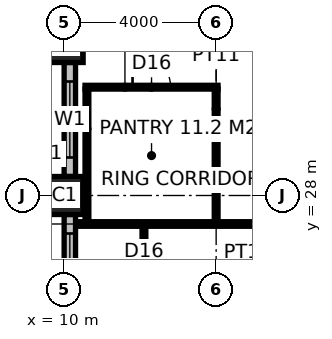
"""IFC4 building model, lengths in metres.
Left out: names, types, materials, properties, quantities, classifications, styles, units other than length and angle.
Written with IfcOpenShell. Run it as: python <this file> out.ifc"""

import sys

from ifc_helpers import new_model, si_unit, direction, frame, frame_2d, origin, origin_2d, place, context, subcontext, project, spatial, rectangle, hollow_rectangle, extrude, element, fill, save


model = new_model("IFC4")
c1 = context("Model", 3, precision=1e-05, world=origin(), true_north=direction((0.0, 1.0)))
c2 = subcontext(c1, "Body", "Model", "MODEL_VIEW")
j1 = project(units=[si_unit("LENGTHUNIT", "METRE"), si_unit("PLANEANGLEUNIT", "RADIAN")], contexts=[c1])
p1 = place(None, origin())
s1 = spatial("IfcSite", under=j1, at=p1, CompositionType="ELEMENT")
p2 = place(p1, origin())
s2 = spatial("IfcBuilding", under=s1, at=p2, CompositionType="ELEMENT")
p3 = place(p2, frame((0.0, 0.0, 121.4)))
s3 = spatial("IfcBuildingStorey", under=s2, at=p3, CompositionType="ELEMENT", Elevation=121.4)
for number, where, z_axis, x_axis in (
    (1, (10.0, 28.0, 0.0), (0.0, 0.0, 1.0), (1.0, 0.0, 0.0)),
    (2, (10.0, 32.0, 0.0), (0.0, 0.0, 1.0), (1.0, 0.0, 0.0)),
):
    element("IfcColumn", number, at=place(p3, frame(where, z_axis=z_axis, x_axis=x_axis)), inside=s3, PredefinedType="COLUMN", context=c2, shape_type="SweptSolid", body=[
        extrude(hollow_rectangle(XDim=1.0, YDim=1.0, WallThickness=0.1, at=origin_2d()), origin(), (0.0, 0.0, 1.0), 4.0),
    ])
p4 = place(p3, frame((10.3, 27.25, 0.0), z_axis=(0.0, 0.0, 1.0), x_axis=(1.0, 0.0, 0.0)))
e3 = element("IfcWall", 3, at=p4, inside=s3, PredefinedType="PARTITIONING", context=c2, shape_type="SweptSolid", body=[
    extrude(rectangle(XDim=5.325, YDim=0.12, at=frame_2d((2.663, 0.0))), origin(), (0.0, 0.0, 1.0), 3.85),
])
p5 = place(p3, frame((10.55, 30.85, 0.0), z_axis=(0.0, 0.0, 1.0), x_axis=(1.0, 0.0, 0.0)))
e4 = element("IfcWall", 4, at=p5, inside=s3, PredefinedType="PARTITIONING", context=c2, shape_type="SweptSolid", body=[
    extrude(rectangle(XDim=3.5, YDim=0.1, at=frame_2d((1.75, 0.0))), origin(), (0.0, 0.0, 1.0), 3.85),
])
p6 = place(p5, frame((1.25, 0.0, 0.0)))
e5 = element("IfcOpeningElement", 5, at=p6, cuts=e4, PredefinedType="OPENING", context=c2, shape_type="SweptSolid", body=[
    extrude(rectangle(XDim=1.0, YDim=2.2, at=frame_2d((0.5, 1.1))), frame((0.0, 0.06, 0.0), z_axis=(0.0, -1.0, 0.0), x_axis=(1.0, 0.0, 0.0)), (0.0, 0.0, 1.0), 0.12),
])
p7 = place(p3, frame((10.6, 27.31, 0.0), z_axis=(0.0, 0.0, 1.0), x_axis=(0.0, 1.0, 0.0)))
e6 = element("IfcWall", 6, at=p7, inside=s3, PredefinedType="PARTITIONING", context=c2, shape_type="SweptSolid", body=[
    extrude(rectangle(XDim=3.49, YDim=0.1, at=frame_2d((1.745, 0.0))), origin(), (0.0, 0.0, 1.0), 3.85),
])
p8 = place(p3, frame((12.1, 23.649, 0.0), z_axis=(0.0, 0.0, 1.0), x_axis=(0.0, 1.0, 0.0)))
e7 = element("IfcWall", 7, at=p8, inside=s3, PredefinedType="PARTITIONING", context=c2, shape_type="SweptSolid", body=[
    extrude(rectangle(XDim=3.54, YDim=0.1, at=frame_2d((1.77, 0.0))), origin(), (0.0, 0.0, 1.0), 3.85),
])
p9 = place(p8, frame((1.275, 0.0, 0.0)))
e8 = element("IfcOpeningElement", 8, at=p9, cuts=e7, PredefinedType="OPENING", context=c2, shape_type="SweptSolid", body=[
    extrude(rectangle(XDim=1.0, YDim=2.2, at=frame_2d((0.5, 1.1))), frame((0.0, 0.06, 0.0), z_axis=(0.0, -1.0, 0.0), x_axis=(1.0, 0.0, 0.0)), (0.0, 0.0, 1.0), 0.12),
])
p10 = place(p3, frame((14.0, 27.31, 0.0), z_axis=(0.0, 0.0, 1.0), x_axis=(0.0, 1.0, 0.0)))
e9 = element("IfcWall", 9, at=p10, inside=s3, PredefinedType="PARTITIONING", context=c2, shape_type="SweptSolid", body=[
    extrude(rectangle(XDim=3.49, YDim=0.1, at=frame_2d((1.745, 0.0))), origin(), (0.0, 0.0, 1.0), 3.85),
])
p11 = place(p3, frame((10.15, 27.5, 0.0), z_axis=(0.0, 0.0, 1.0), x_axis=(0.0, -1.0, 0.0)))
e10 = element("IfcWall", 10, at=p11, inside=s3, PredefinedType="ELEMENTEDWALL", context=c2, shape_type="SweptSolid", body=[
    extrude(rectangle(XDim=3.0, YDim=0.3, at=frame_2d((1.5, 0.0))), origin(), (0.0, 0.0, 1.0), 2.85),
])
p12 = place(p11, frame((0.5, 0.0, 0.8)))
e11 = element("IfcOpeningElement", 11, at=p12, cuts=e10, PredefinedType="OPENING", context=c2, shape_type="SweptSolid", body=[
    extrude(rectangle(XDim=2.0, YDim=2.0, at=frame_2d((1.0, 1.0))), frame((0.0, 0.16, 0.0), z_axis=(0.0, -1.0, 0.0), x_axis=(1.0, 0.0, 0.0)), (0.0, 0.0, 1.0), 0.32),
])
p13 = place(p3, frame((10.15, 31.5, 0.0), z_axis=(0.0, 0.0, 1.0), x_axis=(0.0, -1.0, 0.0)))
e12 = element("IfcWall", 12, at=p13, inside=s3, PredefinedType="ELEMENTEDWALL", context=c2, shape_type="SweptSolid", body=[
    extrude(rectangle(XDim=3.0, YDim=0.3, at=frame_2d((1.5, 0.0))), origin(), (0.0, 0.0, 1.0), 2.85),
])
p14 = place(p13, frame((0.5, 0.0, 0.8)))
e13 = element("IfcOpeningElement", 13, at=p14, cuts=e12, PredefinedType="OPENING", context=c2, shape_type="SweptSolid", body=[
    extrude(rectangle(XDim=2.0, YDim=2.0, at=frame_2d((1.0, 1.0))), frame((0.0, 0.16, 0.0), z_axis=(0.0, -1.0, 0.0), x_axis=(1.0, 0.0, 0.0)), (0.0, 0.0, 1.0), 0.32),
])
p15 = place(p6, origin())
e14 = element("IfcDoor", 14, at=p15, inside=s3, OperationType="SINGLE_SWING_LEFT", PredefinedType="DOOR", context=c2, shape_type="SweptSolid", body=[
    extrude(rectangle(XDim=1.0, YDim=2.2, at=frame_2d((0.5, 1.1))), frame((0.0, 0.025, 0.0), z_axis=(0.0, -1.0, 0.0), x_axis=(1.0, 0.0, 0.0)), (0.0, 0.0, 1.0), 0.05),
])
fill(e5, e14)
p16 = place(p12, origin())
e15 = element("IfcWindow", 15, at=p16, inside=s3, PartitioningType="SINGLE_PANEL", PredefinedType="WINDOW", context=c2, shape_type="SweptSolid", body=[
    extrude(rectangle(XDim=2.0, YDim=2.0, at=frame_2d((1.0, 1.0))), frame((0.0, 0.03, 0.0), z_axis=(0.0, -1.0, 0.0), x_axis=(1.0, 0.0, 0.0)), (0.0, 0.0, 1.0), 0.06),
])
fill(e11, e15)
p17 = place(p14, origin())
e16 = element("IfcWindow", 16, at=p17, inside=s3, PartitioningType="SINGLE_PANEL", PredefinedType="WINDOW", context=c2, shape_type="SweptSolid", body=[
    extrude(rectangle(XDim=2.0, YDim=2.0, at=frame_2d((1.0, 1.0))), frame((0.0, 0.03, 0.0), z_axis=(0.0, -1.0, 0.0), x_axis=(1.0, 0.0, 0.0)), (0.0, 0.0, 1.0), 0.06),
])
fill(e13, e16)
save(model, sys.argv[1])
